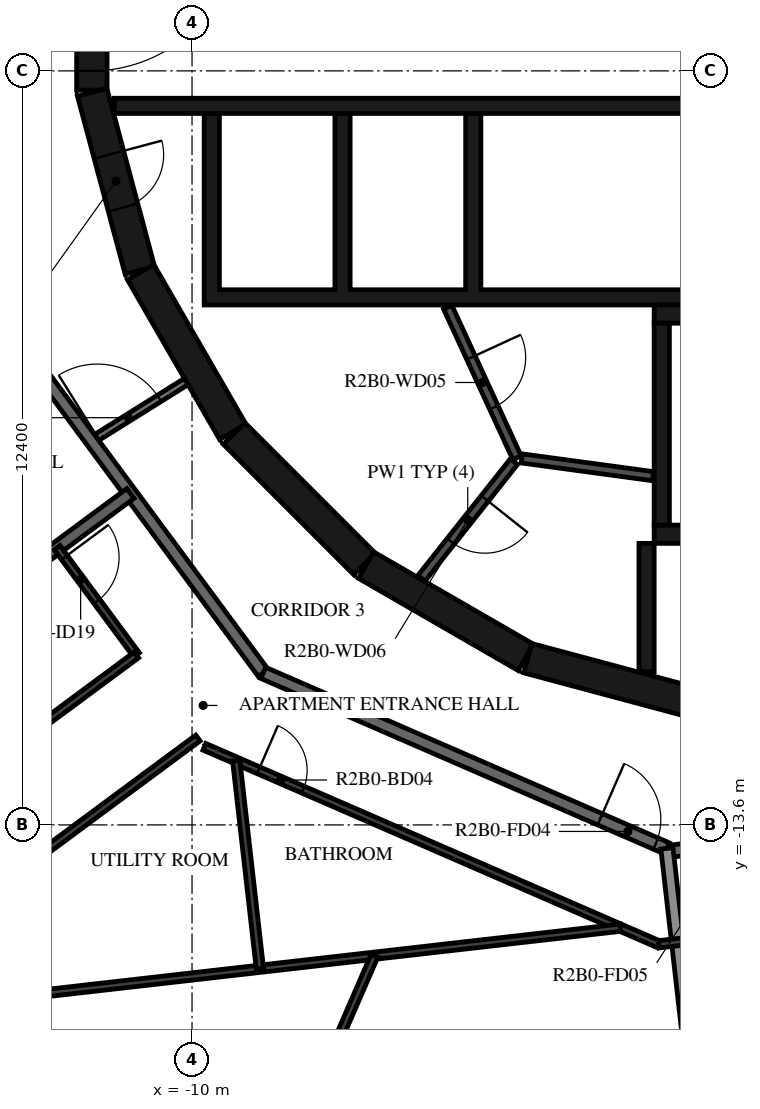
"""IFC4 building model, lengths in metres.
Left out: names, types, materials, properties, quantities, classifications, styles, units other than length and angle.
Written with IfcOpenShell. Run it as: python <this file> out.ifc"""

import sys

from ifc_helpers import new_model, si_unit, direction, frame, frame_2d, origin, place, context, subcontext, project, spatial, polyline, rectangle, outline, extrude, element, fill, save


model = new_model("IFC4")
c1 = context("Model", 3, precision=1e-05, world=origin(), true_north=direction((0.0, 1.0)))
c2 = subcontext(c1, "Body", "Model", "MODEL_VIEW")
j1 = project(units=[si_unit("LENGTHUNIT", "METRE"), si_unit("PLANEANGLEUNIT", "RADIAN")], contexts=[c1])
p1 = place(None, origin())
s1 = spatial("IfcSite", under=j1, at=p1, CompositionType="ELEMENT")
p2 = place(p1, origin())
s2 = spatial("IfcBuilding", under=s1, at=p2, CompositionType="ELEMENT")
p3 = place(p2, frame((0.0, 0.0, 90.7)))
s3 = spatial("IfcBuildingStorey", under=s2, at=p3, CompositionType="ELEMENT", Elevation=90.7)
p4 = place(p3, frame((-11.647, 1.516, 0.0), z_axis=(0.0, 0.0, 1.0), x_axis=(0.0, -1.0, 0.0)))
e1 = element("IfcWall", 1, at=p4, inside=s3, PredefinedType="SHEAR", context=c2, shape_type="SweptSolid", body=[
    extrude(rectangle(XDim=3.033, YDim=0.5, at=frame_2d((1.516, 0.0))), origin(), (0.0, 0.0, 1.0), 3.12),
])
p5 = place(p4, frame((0.316, 0.0, 0.0)))
e2 = element("IfcOpeningElement", 2, at=p5, cuts=e1, PredefinedType="OPENING", context=c2, shape_type="SweptSolid", body=[
    extrude(rectangle(XDim=2.4, YDim=2.1, at=frame_2d((1.2, 1.05))), frame((0.0, 0.26, 0.0), z_axis=(0.0, -1.0, 0.0), x_axis=(1.0, 0.0, 0.0)), (0.0, 0.0, 1.0), 0.52),
])
p6 = place(p3, frame((-11.643, -1.55, 0.0), z_axis=(0.0, 0.0, 1.0), x_axis=(0.258734743916, -0.965948410781, 0.0)))
e3 = element("IfcWall", 3, at=p6, inside=s3, PredefinedType="SHEAR", context=c2, shape_type="SweptSolid", body=[
    extrude(rectangle(XDim=3.033, YDim=0.5, at=frame_2d((1.516, 0.0))), origin(), (0.0, 0.0, 1.0), 3.12),
])
p7 = place(p6, frame((1.066, 0.0, 0.0)))
e4 = element("IfcOpeningElement", 4, at=p7, cuts=e3, PredefinedType="OPENING", context=c2, shape_type="SweptSolid", body=[
    extrude(rectangle(XDim=0.9, YDim=2.1, at=frame_2d((0.45, 1.05))), frame((0.0, 0.26, 0.0), z_axis=(0.0, -1.0, 0.0), x_axis=(1.0, 0.0, 0.0)), (0.0, 0.0, 1.0), 0.52),
])
p8 = place(p3, frame((-10.845, -4.51, 0.0), z_axis=(0.0, 0.0, 1.0), x_axis=(0.500087131594, -0.865975092491, 0.0)))
e5 = element("IfcWall", 5, at=p8, inside=s3, PredefinedType="SHEAR", context=c2, shape_type="SweptSolid", body=[
    extrude(rectangle(XDim=3.033, YDim=0.5, at=frame_2d((1.516, 0.0))), origin(), (0.0, 0.0, 1.0), 3.12),
])
p9 = place(p3, frame((-9.308, -7.164, 0.0), z_axis=(0.0, 0.0, 1.0), x_axis=(0.707106781187, -0.707106781187, 0.0)))
e6 = element("IfcWall", 6, at=p9, inside=s3, PredefinedType="SHEAR", context=c2, shape_type="SweptSolid", body=[
    extrude(rectangle(XDim=3.032, YDim=0.5, at=frame_2d((1.516, 0.0))), origin(), (0.0, 0.0, 1.0), 3.12),
])
for number, where, z_axis, x_axis in (
    (7, (-7.137, -9.329, 0.0), (0.0, 0.0, 1.0), (0.866, -0.5, 0.0)),
    (8, (-4.479, -10.858, 0.0), (0.0, 0.0, 1.0), (0.966, -0.259, 0.0)),
):
    element("IfcWall", number, at=place(p3, frame(where, z_axis=z_axis, x_axis=x_axis)), inside=s3, PredefinedType="SHEAR", context=c2, shape_type="SweptSolid", body=[
        extrude(rectangle(XDim=3.033, YDim=0.5, at=frame_2d((1.516, 0.0))), origin(), (0.0, 0.0, 1.0), 3.12),
    ])
p10 = place(p3, frame((-2.275, -8.67, 0.0), z_axis=(0.0, 0.0, 1.0), x_axis=(0.0, 1.0, 0.0)))
e9 = element("IfcWall", 9, at=p10, inside=s3, PredefinedType="SHEAR", context=c2, shape_type="SweptSolid", body=[
    extrude(rectangle(XDim=3.32, YDim=0.25, at=frame_2d((1.66, 0.0))), origin(), (0.0, 0.0, 1.0), 3.12),
])
p11 = place(p3, frame((-2.4, -5.2, 0.0), z_axis=(0.0, 0.0, 1.0), x_axis=(1.0, 0.0, 0.0)))
e10 = element("IfcWall", 10, at=p11, inside=s3, PredefinedType="SHEAR", context=c2, shape_type="SweptSolid", body=[
    extrude(rectangle(XDim=7.05, YDim=0.3, at=frame_2d((3.525, 0.0))), origin(), (0.0, 0.0, 1.0), 3.12),
])
p12 = place(p3, frame((-2.4, -8.82, 0.0), z_axis=(0.0, 0.0, 1.0), x_axis=(1.0, 0.0, 0.0)))
e11 = element("IfcWall", 11, at=p12, inside=s3, PredefinedType="SHEAR", context=c2, shape_type="SweptSolid", body=[
    extrude(rectangle(XDim=2.5, YDim=0.3, at=frame_2d((1.25, 0.0))), origin(), (0.0, 0.0, 1.0), 3.12),
])
p13 = place(p12, frame((0.65, 0.0, 0.0)))
e12 = element("IfcOpeningElement", 12, at=p13, cuts=e11, PredefinedType="OPENING", context=c2, shape_type="SweptSolid", body=[
    extrude(rectangle(XDim=1.2, YDim=2.1, at=frame_2d((0.6, 1.05))), frame((0.0, 0.16, 0.0), z_axis=(0.0, -1.0, 0.0), x_axis=(1.0, 0.0, 0.0)), (0.0, 0.0, 1.0), 0.32),
])
p14 = place(p3, frame((-2.525, -8.97, 0.0), z_axis=(0.0, 0.0, 1.0), x_axis=(0.0, -1.0, 0.0)))
e13 = element("IfcWall", 13, at=p14, inside=s3, PredefinedType="SHEAR", context=c2, shape_type="SweptSolid", body=[
    extrude(rectangle(XDim=2.11, YDim=0.25, at=frame_2d((1.055, 0.0))), origin(), (0.0, 0.0, 1.0), 3.12),
])
p15 = place(p3, origin())
e14 = element("IfcWall", 14, at=p15, inside=s3, PredefinedType="SHEAR", context=c2, shape_type="SweptSolid", body=[
    extrude(outline(polyline([(9.8, -5.05), (9.8, -4.8), (9.8, -1.9), (9.55, -1.9), (9.55, -4.8), (7.65, -4.8), (7.65, -1.9), (7.4, -1.9), (7.4, -4.8), (5.5, -4.8), (5.5, -1.9), (5.25, -1.9), (5.25, -4.8), (3.35, -4.8), (3.35, -1.9), (3.1, -1.9), (3.1, -4.8), (-5.25, -4.8), (-5.25, -1.9), (-5.5, -1.9), (-5.5, -4.8), (-7.4, -4.8), (-7.4, -1.9), (-7.65, -1.9), (-7.65, -4.8), (-9.55, -4.8), (-9.55, -1.9), (-9.8, -1.9), (-9.8, -4.8), (-9.8, -5.05), (9.8, -5.05)])), origin(), (0.0, 0.0, 1.0), 3.12),
])
p16 = place(p3, frame((-11.28, -1.775, 0.0), z_axis=(0.0, 0.0, 1.0), x_axis=(1.0, 0.0, 0.0)))
e15 = element("IfcWall", 15, at=p16, inside=s3, PredefinedType="SHEAR", context=c2, shape_type="SweptSolid", body=[
    extrude(rectangle(XDim=14.38, YDim=0.25, at=frame_2d((7.19, 0.0))), origin(), (0.0, 0.0, 1.0), 3.12),
])
p17 = place(p16, frame((9.755, 0.0, 0.0)))
e16 = element("IfcOpeningElement", 16, at=p17, cuts=e15, PredefinedType="OPENING", context=c2, shape_type="SweptSolid", body=[
    extrude(rectangle(XDim=0.9, YDim=2.1, at=frame_2d((0.45, 1.05))), frame((0.0, 0.135, 0.0), z_axis=(0.0, -1.0, 0.0), x_axis=(1.0, 0.0, 0.0)), (0.0, 0.0, 1.0), 0.27),
])
p18 = place(p3, frame((-5.795, -5.086, 0.0), z_axis=(0.0, 0.0, 1.0), x_axis=(0.417887867606, -0.908498613157, 0.0)))
e17 = element("IfcWall", 17, at=p18, inside=s3, PredefinedType="PARTITIONING", context=c2, shape_type="SweptSolid", body=[
    extrude(rectangle(XDim=2.726, YDim=0.15, at=frame_2d((1.363, 0.0))), origin(), (0.0, 0.0, 1.0), 3.12),
])
p19 = place(p18, frame((0.913, 0.0, 0.0)))
e18 = element("IfcOpeningElement", 18, at=p19, cuts=e17, PredefinedType="OPENING", context=c2, shape_type="SweptSolid", body=[
    extrude(rectangle(XDim=0.9, YDim=2.1, at=frame_2d((0.45, 1.05))), frame((0.0, 0.085, 0.0), z_axis=(0.0, -1.0, 0.0), x_axis=(1.0, 0.0, 0.0)), (0.0, 0.0, 1.0), 0.17),
])
p20 = place(p3, frame((-4.706, -7.625, 0.0), z_axis=(0.0, 0.0, 1.0), x_axis=(-0.621392599334, -0.783499353856, 0.0)))
e19 = element("IfcWall", 19, at=p20, inside=s3, PredefinedType="PARTITIONING", context=c2, shape_type="SweptSolid", body=[
    extrude(rectangle(XDim=2.447, YDim=0.15, at=frame_2d((1.224, 0.0))), origin(), (0.0, 0.0, 1.0), 3.12),
])
p21 = place(p20, frame((0.774, 0.0, 0.0)))
e20 = element("IfcOpeningElement", 20, at=p21, cuts=e19, PredefinedType="OPENING", context=c2, shape_type="SweptSolid", body=[
    extrude(rectangle(XDim=0.9, YDim=2.1, at=frame_2d((0.45, 1.05))), frame((0.0, 0.085, 0.0), z_axis=(0.0, -1.0, 0.0), x_axis=(1.0, 0.0, 0.0)), (0.0, 0.0, 1.0), 0.17),
])
p22 = place(p3, frame((-2.42, -7.865, 0.0), z_axis=(0.0, 0.0, 1.0), x_axis=(-0.990972299108, 0.134066783362, 0.0)))
e21 = element("IfcWall", 21, at=p22, inside=s3, PredefinedType="PARTITIONING", context=c2, shape_type="SweptSolid", body=[
    extrude(rectangle(XDim=2.176, YDim=0.15, at=frame_2d((1.088, 0.0))), origin(), (0.0, 0.0, 1.0), 3.12),
])
p23 = place(p3, frame((-11.654, -7.282, 0.0), z_axis=(0.0, 0.0, 1.0), x_axis=(0.848117698675, 0.529807860638, 0.0)))
e22 = element("IfcWall", 22, at=p23, inside=s3, PredefinedType="PARTITIONING", context=c2, shape_type="SweptSolid", body=[
    extrude(rectangle(XDim=1.838, YDim=0.12, at=frame_2d((0.919, 0.0))), origin(), (0.0, 0.0, 1.0), 3.12),
])
p24 = place(p23, frame((0.115, 0.0, 0.0)))
e23 = element("IfcOpeningElement", 23, at=p24, cuts=e22, PredefinedType="OPENING", context=c2, shape_type="SweptSolid", body=[
    extrude(rectangle(XDim=1.2, YDim=2.1, at=frame_2d((0.6, 1.05))), frame((0.0, 0.07, 0.0), z_axis=(0.0, -1.0, 0.0), x_axis=(1.0, 0.0, 0.0)), (0.0, 0.0, 1.0), 0.14),
])
p25 = place(p3, frame((-13.196, -5.198, 0.0), z_axis=(0.0, 0.0, 1.0), x_axis=(0.594805187394, -0.803869883159, 0.0)))
e24 = element("IfcWall", 24, at=p25, inside=s3, PredefinedType="STANDARD", context=c2, shape_type="SweptSolid", body=[
    extrude(rectangle(XDim=7.342, YDim=0.2, at=frame_2d((3.671, 0.0))), origin(), (0.0, 0.0, 1.0), 3.12),
])
p26 = place(p3, frame((-8.829, -11.1, 0.0), z_axis=(0.0, 0.0, 1.0), x_axis=(0.917063622491, -0.398740908742, 0.0)))
e25 = element("IfcWall", 25, at=p26, inside=s3, PredefinedType="STANDARD", context=c2, shape_type="SweptSolid", body=[
    extrude(rectangle(XDim=7.24, YDim=0.2, at=frame_2d((3.62, 0.0))), origin(), (0.0, 0.0, 1.0), 3.12),
])
p27 = place(p26, frame((6.04, 0.0, 0.0)))
e26 = element("IfcOpeningElement", 26, at=p27, cuts=e25, PredefinedType="OPENING", context=c2, shape_type="SweptSolid", body=[
    extrude(rectangle(XDim=1.0, YDim=2.1, at=frame_2d((0.5, 1.05))), frame((0.0, 0.11, 0.0), z_axis=(0.0, -1.0, 0.0), x_axis=(1.0, 0.0, 0.0)), (0.0, 0.0, 1.0), 0.22),
])
p28 = place(p3, frame((-2.096, -14.028, 0.0), z_axis=(0.0, 0.0, 1.0), x_axis=(0.993569170114, 0.113226782163, 0.0)))
e27 = element("IfcWall", 27, at=p28, inside=s3, PredefinedType="STANDARD", context=c2, shape_type="SweptSolid", body=[
    extrude(rectangle(XDim=7.342, YDim=0.2, at=frame_2d((3.671, 0.0))), origin(), (0.0, 0.0, 1.0), 3.12),
])
p29 = place(p28, frame((0.5, 0.0, 0.0)))
e28 = element("IfcOpeningElement", 28, at=p29, cuts=e27, PredefinedType="OPENING", context=c2, shape_type="SweptSolid", body=[
    extrude(rectangle(XDim=1.0, YDim=2.1, at=frame_2d((0.5, 1.05))), frame((0.0, 0.11, 0.0), z_axis=(0.0, -1.0, 0.0), x_axis=(1.0, 0.0, 0.0)), (0.0, 0.0, 1.0), 0.22),
])
p30 = place(p3, frame((-16.649, -12.32, 0.0), z_axis=(0.0, 0.0, 1.0), x_axis=(0.803869204071, 0.594806105169, 0.0)))
e29 = element("IfcWall", 29, at=p30, inside=s3, PredefinedType="STANDARD", context=c2, shape_type="SweptSolid", body=[
    extrude(rectangle(XDim=7.011, YDim=0.2, at=frame_2d((3.506, 0.0))), origin(), (0.0, 0.0, 1.0), 3.12),
])
p31 = place(p3, frame((-1.555, -19.559, 0.0), z_axis=(0.0, 0.0, 1.0), x_axis=(-0.113221250863, 0.993569800443, 0.0)))
e30 = element("IfcWall", 30, at=p31, inside=s3, PredefinedType="STANDARD", context=c2, shape_type="SweptSolid", body=[
    extrude(rectangle(XDim=5.609, YDim=0.2, at=frame_2d((2.804, 0.0))), origin(), (0.0, 0.0, 1.0), 2.73),
])
p32 = place(p3, frame((-12.219, -9.041, 0.0), z_axis=(0.0, 0.0, 1.0), x_axis=(0.59482286703, -0.803856801214, 0.0)))
e31 = element("IfcWall", 31, at=p32, inside=s3, PredefinedType="PARTITIONING", context=c2, shape_type="SweptSolid", body=[
    extrude(rectangle(XDim=2.193, YDim=0.12, at=frame_2d((1.097, 0.0))), origin(), (0.0, 0.0, 1.0), 3.12),
])
p33 = place(p32, frame((0.2, 0.0, 0.0)))
e32 = element("IfcOpeningElement", 32, at=p33, cuts=e31, PredefinedType="OPENING", context=c2, shape_type="SweptSolid", body=[
    extrude(rectangle(XDim=0.9, YDim=2.1, at=frame_2d((0.45, 1.05))), frame((0.0, 0.07, 0.0), z_axis=(0.0, -1.0, 0.0), x_axis=(1.0, 0.0, 0.0)), (0.0, 0.0, 1.0), 0.14),
])
p34 = place(p3, frame((-10.914, -10.804, 0.0), z_axis=(0.0, 0.0, 1.0), x_axis=(-0.803864616889, -0.594812304609, 0.0)))
e33 = element("IfcWall", 33, at=p34, inside=s3, PredefinedType="PARTITIONING", context=c2, shape_type="SweptSolid", body=[
    extrude(rectangle(XDim=4.008, YDim=0.12, at=frame_2d((2.004, 0.0))), origin(), (0.0, 0.0, 1.0), 3.12),
])
p35 = place(p3, frame((-13.125, -14.555, 0.0), z_axis=(0.0, 0.0, 1.0), x_axis=(0.80389374229, 0.594772940799, 0.0)))
e34 = element("IfcWall", 34, at=p35, inside=s3, PredefinedType="PARTITIONING", context=c2, shape_type="SweptSolid", body=[
    extrude(rectangle(XDim=4.008, YDim=0.12, at=frame_2d((2.004, 0.0))), origin(), (0.0, 0.0, 1.0), 3.12),
])
p36 = place(p3, frame((-9.796, -12.315, 0.0), z_axis=(0.0, 0.0, 1.0), x_axis=(0.917059572812, -0.398750222463, 0.0)))
e35 = element("IfcWall", 35, at=p36, inside=s3, PredefinedType="PARTITIONING", context=c2, shape_type="SweptSolid", body=[
    extrude(rectangle(XDim=8.146, YDim=0.12, at=frame_2d((4.073, 0.0))), origin(), (0.0, 0.0, 1.0), 3.12),
])
p37 = place(p36, frame((0.969, 0.0, 0.0)))
e36 = element("IfcOpeningElement", 36, at=p37, cuts=e35, PredefinedType="OPENING", context=c2, shape_type="SweptSolid", body=[
    extrude(rectangle(XDim=0.8, YDim=2.1, at=frame_2d((0.4, 1.05))), frame((0.0, 0.07, 0.0), z_axis=(0.0, -1.0, 0.0), x_axis=(1.0, 0.0, 0.0)), (0.0, 0.0, 1.0), 0.14),
])
p38 = place(p3, frame((-2.326, -15.563, 0.0), z_axis=(0.0, 0.0, 1.0), x_axis=(0.993575068384, 0.113175012641, 0.0)))
e37 = element("IfcWall", 37, at=p38, inside=s3, PredefinedType="PARTITIONING", context=c2, shape_type="SweptSolid", body=[
    extrude(rectangle(XDim=3.799, YDim=0.12, at=frame_2d((1.899, 0.0))), origin(), (0.0, 0.0, 1.0), 3.12),
])
p39 = place(p38, frame((0.513, 0.0, 0.0)))
e38 = element("IfcOpeningElement", 38, at=p39, cuts=e37, PredefinedType="OPENING", context=c2, shape_type="SweptSolid", body=[
    extrude(rectangle(XDim=0.9, YDim=2.1, at=frame_2d((0.45, 1.05))), frame((0.0, 0.07, 0.0), z_axis=(0.0, -1.0, 0.0), x_axis=(1.0, 0.0, 0.0)), (0.0, 0.0, 1.0), 0.14),
])
p40 = place(p3, frame((-17.437, -16.94, 0.0), z_axis=(0.0, 0.0, 1.0), x_axis=(0.993573314119, 0.113190412448, 0.0)))
e39 = element("IfcWall", 39, at=p40, inside=s3, PredefinedType="PARTITIONING", context=c2, shape_type="SweptSolid", body=[
    extrude(rectangle(XDim=14.576, YDim=0.12, at=frame_2d((7.288, 0.0))), origin(), (0.0, 0.0, 1.0), 3.12),
])
p41 = place(p40, frame((3.201, 0.0, 0.0)))
e40 = element("IfcOpeningElement", 40, at=p41, cuts=e39, PredefinedType="OPENING", context=c2, shape_type="SweptSolid", body=[
    extrude(rectangle(XDim=0.9, YDim=2.1, at=frame_2d((0.45, 1.05))), frame((0.0, 0.07, 0.0), z_axis=(0.0, -1.0, 0.0), x_axis=(1.0, 0.0, 0.0)), (0.0, 0.0, 1.0), 0.14),
])
p42 = place(p40, frame((0.2, 0.0, 0.0)))
e41 = element("IfcOpeningElement", 41, at=p42, cuts=e39, PredefinedType="OPENING", context=c2, shape_type="SweptSolid", body=[
    extrude(rectangle(XDim=0.9, YDim=2.1, at=frame_2d((0.45, 1.05))), frame((0.0, 0.07, 0.0), z_axis=(0.0, -1.0, 0.0), x_axis=(1.0, 0.0, 0.0)), (0.0, 0.0, 1.0), 0.14),
])
p43 = place(p3, frame((-8.884, -15.966, 0.0), z_axis=(0.0, 0.0, 1.0), x_axis=(-0.113230836929, 0.993568708026, 0.0)))
e42 = element("IfcWall", 42, at=p43, inside=s3, PredefinedType="PARTITIONING", context=c2, shape_type="SweptSolid", body=[
    extrude(rectangle(XDim=3.446, YDim=0.12, at=frame_2d((1.723, 0.0))), origin(), (0.0, 0.0, 1.0), 3.12),
])
p44 = place(p3, frame((-9.026, -20.41, 0.0), z_axis=(0.0, 0.0, 1.0), x_axis=(0.398750711167, 0.917059360316, 0.0)))
e43 = element("IfcWall", 43, at=p44, inside=s3, PredefinedType="PARTITIONING", context=c2, shape_type="SweptSolid", body=[
    extrude(rectangle(XDim=5.081, YDim=0.12, at=frame_2d((2.54, 0.0))), origin(), (0.0, 0.0, 1.0), 3.12),
])
p45 = place(p44, frame((0.4, 0.0, 0.0)))
e44 = element("IfcOpeningElement", 44, at=p45, cuts=e43, PredefinedType="OPENING", context=c2, shape_type="SweptSolid", body=[
    extrude(rectangle(XDim=0.9, YDim=2.1, at=frame_2d((0.45, 1.05))), frame((0.0, 0.07, 0.0), z_axis=(0.0, -1.0, 0.0), x_axis=(1.0, 0.0, 0.0)), (0.0, 0.0, 1.0), 0.14),
])
p46 = place(p5, origin())
e45 = element("IfcDoor", 45, at=p46, inside=s3, OperationType="DOUBLE_DOOR_SINGLE_SWING", PredefinedType="DOOR", context=c2, shape_type="SweptSolid", body=[
    extrude(rectangle(XDim=2.4, YDim=2.1, at=frame_2d((1.2, 1.05))), frame((0.0, 0.025, 0.0), z_axis=(0.0, -1.0, 0.0), x_axis=(1.0, 0.0, 0.0)), (0.0, 0.0, 1.0), 0.05),
])
fill(e2, e45)
p47 = place(p19, origin())
e46 = element("IfcDoor", 46, at=p47, inside=s3, OperationType="SINGLE_SWING_RIGHT", PredefinedType="DOOR", context=c2, shape_type="SweptSolid", body=[
    extrude(rectangle(XDim=0.9, YDim=2.1, at=frame_2d((0.45, 1.05))), frame((0.0, 0.025, 0.0), z_axis=(0.0, -1.0, 0.0), x_axis=(1.0, 0.0, 0.0)), (0.0, 0.0, 1.0), 0.05),
])
fill(e18, e46)
p48 = place(p21, origin())
e47 = element("IfcDoor", 47, at=p48, inside=s3, OperationType="SINGLE_SWING_LEFT", PredefinedType="DOOR", context=c2, shape_type="SweptSolid", body=[
    extrude(rectangle(XDim=0.9, YDim=2.1, at=frame_2d((0.45, 1.05))), frame((0.0, 0.025, 0.0), z_axis=(0.0, -1.0, 0.0), x_axis=(1.0, 0.0, 0.0)), (0.0, 0.0, 1.0), 0.05),
])
fill(e20, e47)
p49 = place(p7, origin())
e48 = element("IfcDoor", 48, at=p49, inside=s3, OperationType="SINGLE_SWING_RIGHT", PredefinedType="DOOR", context=c2, shape_type="SweptSolid", body=[
    extrude(rectangle(XDim=0.9, YDim=2.1, at=frame_2d((0.45, 1.05))), frame((0.0, 0.025, 0.0), z_axis=(0.0, -1.0, 0.0), x_axis=(1.0, 0.0, 0.0)), (0.0, 0.0, 1.0), 0.05),
])
fill(e4, e48)
p50 = place(p27, origin())
e49 = element("IfcDoor", 49, at=p50, inside=s3, OperationType="SINGLE_SWING_LEFT", PredefinedType="DOOR", context=c2, shape_type="SweptSolid", body=[
    extrude(rectangle(XDim=1.0, YDim=2.1, at=frame_2d((0.5, 1.05))), frame((0.0, 0.025, 0.0), z_axis=(0.0, -1.0, 0.0), x_axis=(1.0, 0.0, 0.0)), (0.0, 0.0, 1.0), 0.05),
])
fill(e26, e49)
p51 = place(p33, origin())
e50 = element("IfcDoor", 50, at=p51, inside=s3, OperationType="SINGLE_SWING_LEFT", PredefinedType="DOOR", context=c2, shape_type="SweptSolid", body=[
    extrude(rectangle(XDim=0.9, YDim=2.1, at=frame_2d((0.45, 1.05))), frame((0.0, 0.025, 0.0), z_axis=(0.0, -1.0, 0.0), x_axis=(1.0, 0.0, 0.0)), (0.0, 0.0, 1.0), 0.05),
])
fill(e32, e50)
p52 = place(p37, origin())
e51 = element("IfcDoor", 51, at=p52, inside=s3, OperationType="SINGLE_SWING_LEFT", PredefinedType="DOOR", context=c2, shape_type="SweptSolid", body=[
    extrude(rectangle(XDim=0.8, YDim=2.1, at=frame_2d((0.4, 1.05))), frame((0.0, 0.025, 0.0), z_axis=(0.0, -1.0, 0.0), x_axis=(1.0, 0.0, 0.0)), (0.0, 0.0, 1.0), 0.05),
])
fill(e36, e51)
p53 = place(p24, origin())
e52 = element("IfcDoor", 52, at=p53, inside=s3, OperationType="DOUBLE_DOOR_SINGLE_SWING", PredefinedType="DOOR", context=c2, shape_type="SweptSolid", body=[
    extrude(rectangle(XDim=1.2, YDim=2.1, at=frame_2d((0.6, 1.05))), frame((0.0, 0.025, 0.0), z_axis=(0.0, -1.0, 0.0), x_axis=(1.0, 0.0, 0.0)), (0.0, 0.0, 1.0), 0.05),
])
fill(e23, e52)
save(model, sys.argv[1])
